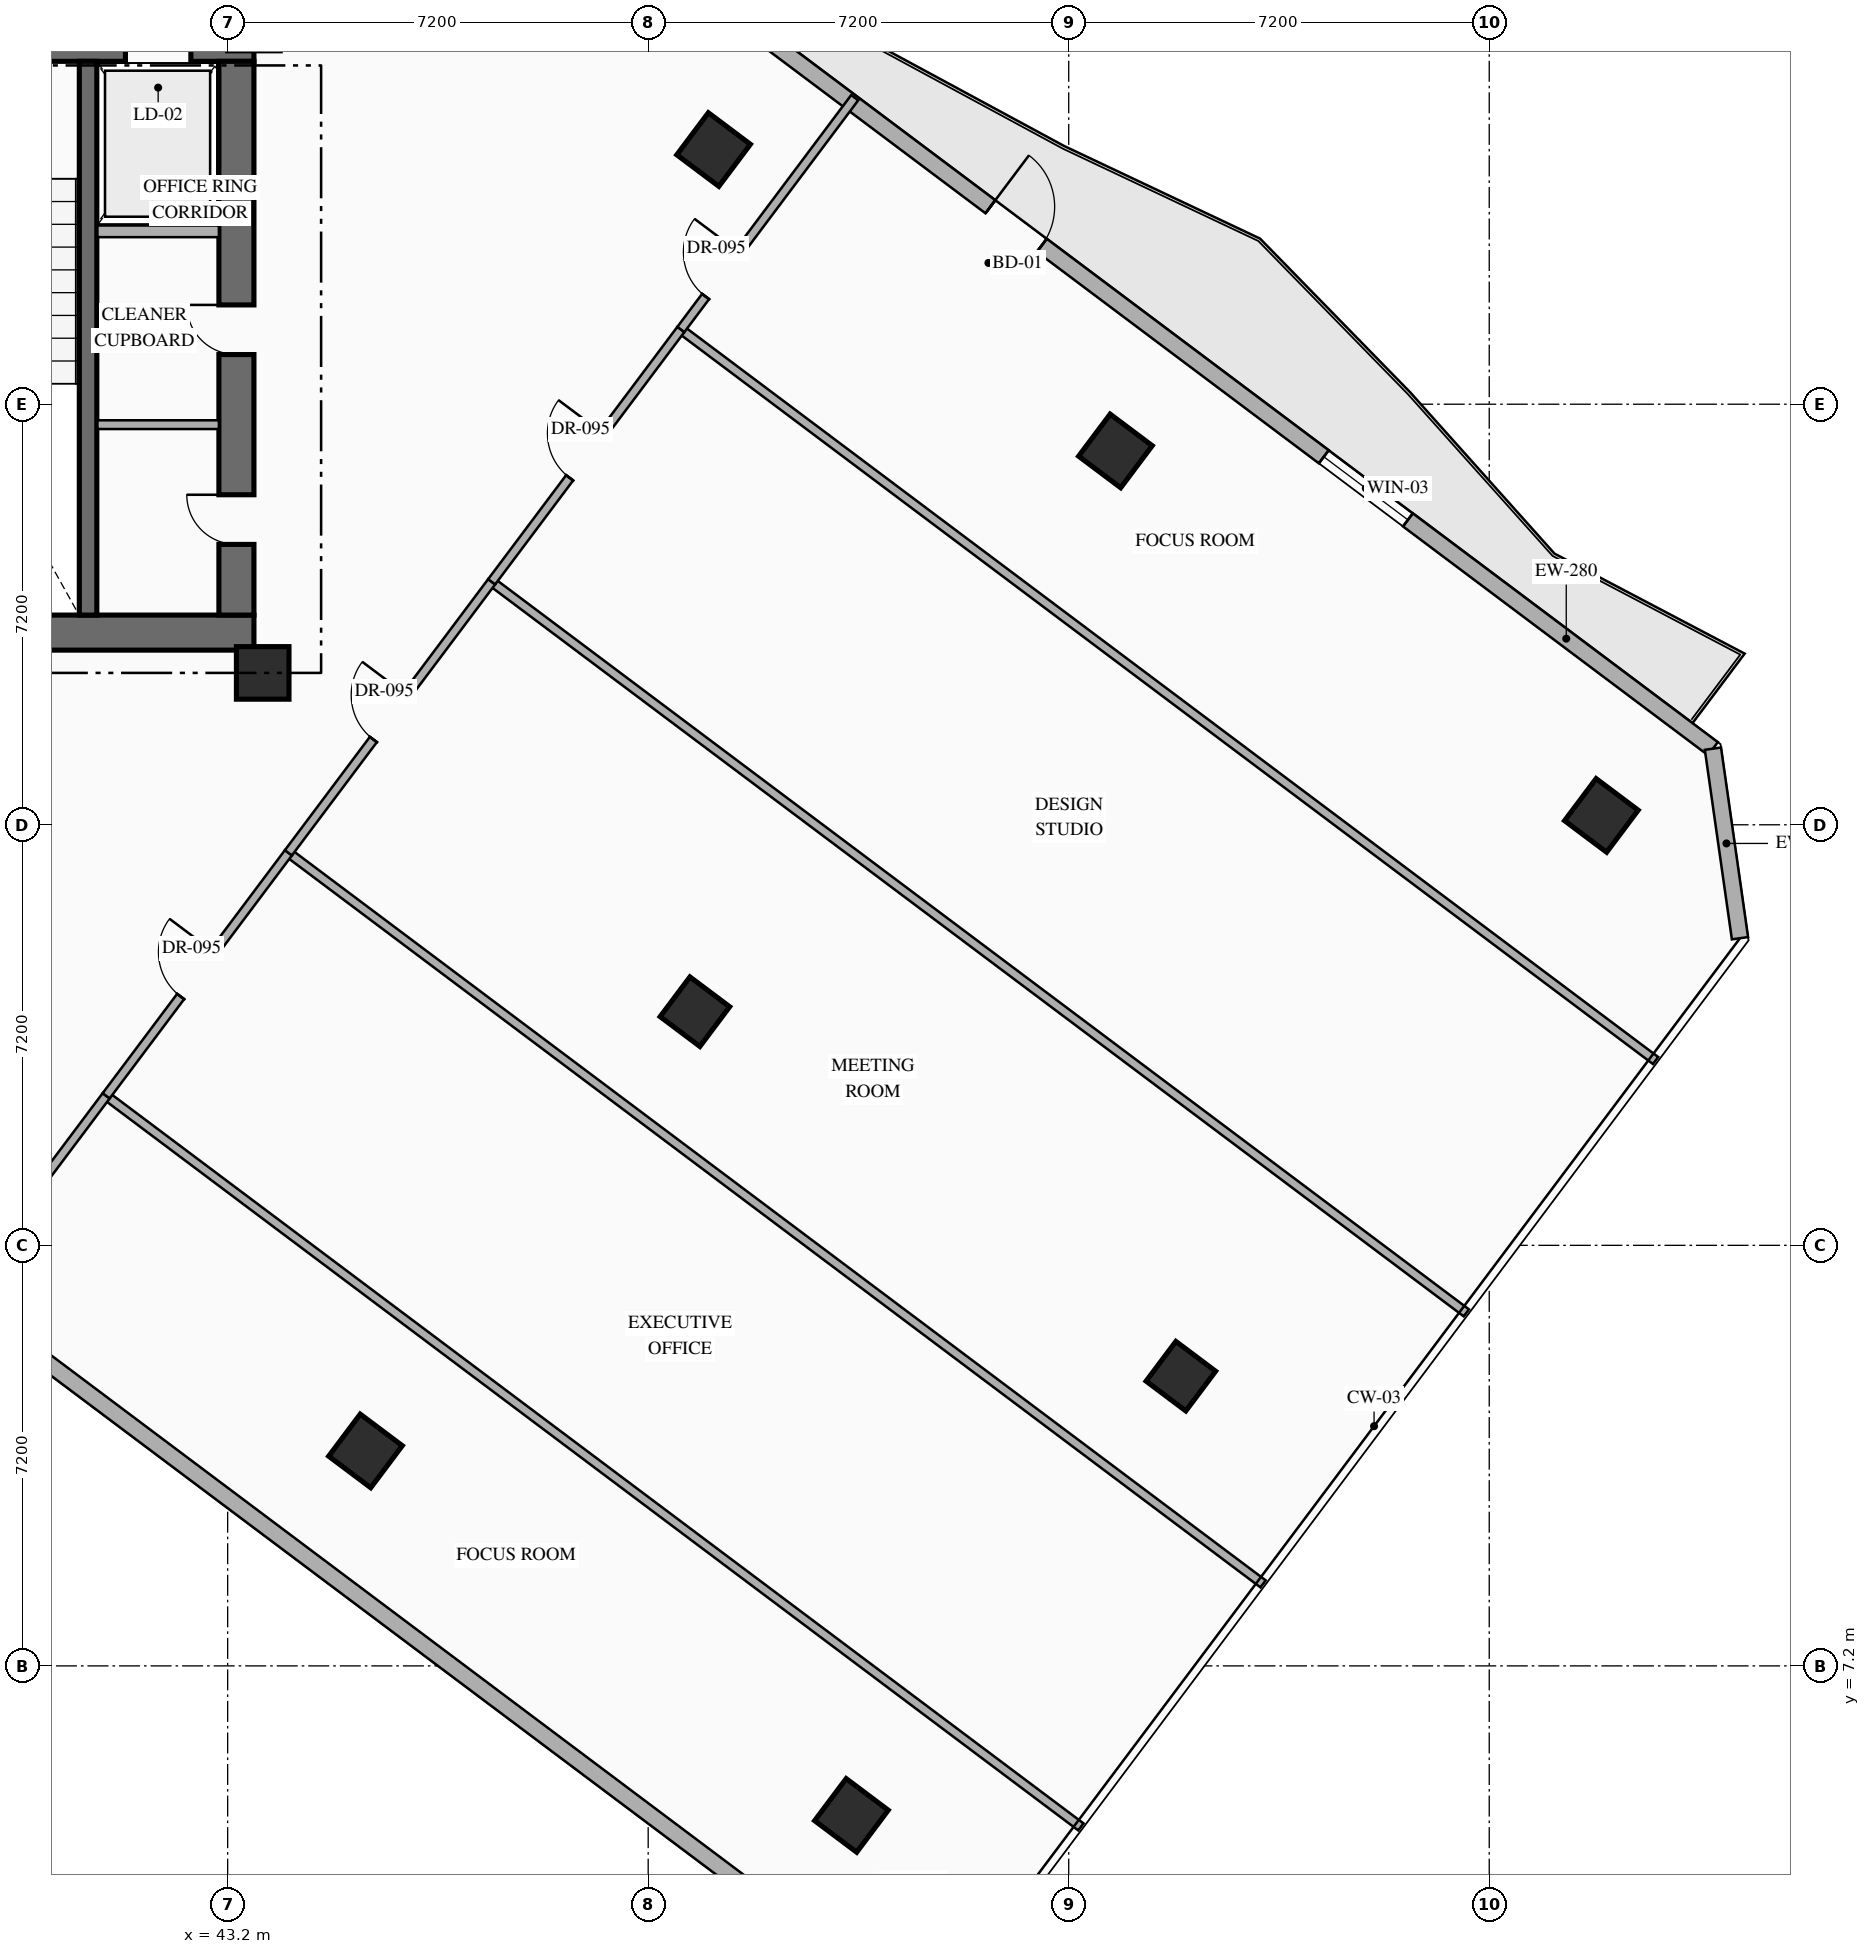
"""IFC4 building model, lengths in metres.
Left out: names, types, materials, properties, quantities, classifications, styles, units other than length and angle.
Written with IfcOpenShell. Run it as: python <this file> out.ifc"""

import sys

from ifc_helpers import new_model, si_unit, direction, frame, frame_2d, origin, origin_2d, place, context, subcontext, project, spatial, rectangle, hollow_rectangle, extrude, element, fill, save


model = new_model("IFC4")
c1 = context("Model", 3, precision=1e-05, world=origin(), true_north=direction((0.0, 1.0)))
c2 = subcontext(c1, "Body", "Model", "MODEL_VIEW")
j1 = project(units=[si_unit("LENGTHUNIT", "METRE"), si_unit("PLANEANGLEUNIT", "RADIAN")], contexts=[c1])
p1 = place(None, origin())
s1 = spatial("IfcSite", under=j1, at=p1, CompositionType="ELEMENT")
p2 = place(p1, origin())
s2 = spatial("IfcBuilding", under=s1, at=p2, CompositionType="ELEMENT")
p3 = place(p2, frame((0.0, 0.0, 122.85)))
s3 = spatial("IfcBuildingStorey", under=s2, at=p3, CompositionType="ELEMENT", Elevation=122.85)
p4 = place(p3, frame((35.89, 24.89, 0.0), z_axis=(0.0, 0.0, 1.0), x_axis=(1.0, 0.0, 0.0)))
e1 = element("IfcWall", 1, at=p4, inside=s3, PredefinedType="SHEAR", context=c2, shape_type="SweptSolid", body=[
    extrude(rectangle(XDim=7.76, YDim=0.6, at=frame_2d((3.88, 0.0))), origin(), (0.0, 0.0, 1.0), 3.6),
])
p5 = place(p3, frame((35.89, 34.97, 0.0), z_axis=(0.0, 0.0, 1.0), x_axis=(1.0, 0.0, 0.0)))
e2 = element("IfcWall", 2, at=p5, inside=s3, PredefinedType="SHEAR", context=c2, shape_type="SweptSolid", body=[
    extrude(rectangle(XDim=7.76, YDim=0.6, at=frame_2d((3.88, 0.0))), origin(), (0.0, 0.0, 1.0), 3.6),
])
p6 = place(p5, frame((2.66, 0.0, 0.0)))
e3 = element("IfcOpeningElement", 3, at=p6, cuts=e2, PredefinedType="OPENING", context=c2, shape_type="SweptSolid", body=[
    extrude(rectangle(XDim=1.1, YDim=2.2, at=frame_2d((0.55, 1.1))), frame((0.0, 0.31, 0.0), z_axis=(0.0, -1.0, 0.0), x_axis=(1.0, 0.0, 0.0)), (0.0, 0.0, 1.0), 0.62),
])
p7 = place(p5, frame((5.56, 0.0, 0.0)))
e4 = element("IfcOpeningElement", 4, at=p7, cuts=e2, PredefinedType="OPENING", context=c2, shape_type="SweptSolid", body=[
    extrude(rectangle(XDim=1.12, YDim=2.15, at=frame_2d((0.56, 1.075))), frame((0.0, 0.31, 0.0), z_axis=(0.0, -1.0, 0.0), x_axis=(1.0, 0.0, 0.0)), (0.0, 0.0, 1.0), 0.62),
])
p8 = place(p3, frame((43.35, 25.19, 0.0), z_axis=(0.0, 0.0, 1.0), x_axis=(0.0, 1.0, 0.0)))
e5 = element("IfcWall", 5, at=p8, inside=s3, PredefinedType="SHEAR", context=c2, shape_type="SweptSolid", body=[
    extrude(rectangle(XDim=9.48, YDim=0.6, at=frame_2d((4.74, 0.0))), origin(), (0.0, 0.0, 1.0), 3.6),
])
p9 = place(p8, frame((1.21, 0.0, 0.0)))
e6 = element("IfcOpeningElement", 6, at=p9, cuts=e5, PredefinedType="OPENING", context=c2, shape_type="SweptSolid", body=[
    extrude(rectangle(XDim=0.85, YDim=2.08, at=frame_2d((0.425, 1.04))), frame((0.0, 0.31, 0.0), z_axis=(0.0, -1.0, 0.0), x_axis=(1.0, 0.0, 0.0)), (0.0, 0.0, 1.0), 0.62),
])
p10 = place(p8, frame((4.46, 0.0, 0.0)))
e7 = element("IfcOpeningElement", 7, at=p10, cuts=e5, PredefinedType="OPENING", context=c2, shape_type="SweptSolid", body=[
    extrude(rectangle(XDim=0.85, YDim=2.08, at=frame_2d((0.425, 1.04))), frame((0.0, 0.31, 0.0), z_axis=(0.0, -1.0, 0.0), x_axis=(1.0, 0.0, 0.0)), (0.0, 0.0, 1.0), 0.62),
])
p11 = place(p3, frame((40.81, 25.19, 0.0), z_axis=(0.0, 0.0, 1.0), x_axis=(0.0, 1.0, 0.0)))
e8 = element("IfcWall", 8, at=p11, inside=s3, PredefinedType="SHEAR", context=c2, shape_type="SweptSolid", body=[
    extrude(rectangle(XDim=9.48, YDim=0.3, at=frame_2d((4.74, 0.0))), origin(), (0.0, 0.0, 1.0), 3.6),
])
p12 = place(p3, frame((43.8, 24.2, 0.0), z_axis=(0.0, 0.0, 1.0), x_axis=(1.0, 0.0, 0.0)))
e9 = element("IfcColumn", 9, at=p12, inside=s3, PredefinedType="COLUMN", context=c2, shape_type="SweptSolid", body=[
    extrude(rectangle(XDim=0.9, YDim=0.9, at=origin_2d()), origin(), (0.0, 0.0, 1.0), 3.6),
])
for number, where, z_axis, x_axis in (
    (10, (51.52, 33.16, 0.0), (0.0, 0.0, 1.0), (0.8, -0.6, 0.0)),
    (11, (45.56, 10.88, 0.0), (0.0, 0.0, 1.0), (0.8, -0.6, 0.0)),
    (12, (58.4, 28.0, 0.0), (0.0, 0.0, 1.0), (0.8, -0.6, 0.0)),
):
    element("IfcColumn", number, at=place(p3, frame(where, z_axis=z_axis, x_axis=x_axis)), inside=s3, PredefinedType="COLUMN", context=c2, shape_type="SweptSolid", body=[
        extrude(hollow_rectangle(XDim=0.9, YDim=0.9, WallThickness=0.036, at=origin_2d()), origin(), (0.0, 0.0, 1.0), 3.6),
    ])
p13 = place(p3, frame((51.2, 18.4, 0.0), z_axis=(0.0, 0.0, 1.0), x_axis=(0.799999996291, -0.600000004945, 0.0)))
e13 = element("IfcColumn", 13, at=p13, inside=s3, PredefinedType="COLUMN", context=c2, shape_type="SweptSolid", body=[
    extrude(hollow_rectangle(XDim=0.85, YDim=0.85, WallThickness=0.032, at=origin_2d()), origin(), (0.0, 0.0, 1.0), 3.6),
])
for number, where, z_axis, x_axis in (
    (14, (53.88, 4.64, 0.0), (0.0, 0.0, 1.0), (0.8, -0.6, 0.0)),
    (15, (66.72, 21.76, 0.0), (0.0, 0.0, 1.0), (0.8, -0.6, 0.0)),
):
    element("IfcColumn", number, at=place(p3, frame(where, z_axis=z_axis, x_axis=x_axis)), inside=s3, PredefinedType="COLUMN", context=c2, shape_type="SweptSolid", body=[
        extrude(hollow_rectangle(XDim=0.9, YDim=0.9, WallThickness=0.036, at=origin_2d()), origin(), (0.0, 0.0, 1.0), 3.6),
    ])
p14 = place(p3, frame((59.52, 12.16, 0.0), z_axis=(0.0, 0.0, 1.0), x_axis=(0.799999996291, -0.600000004945, 0.0)))
e16 = element("IfcColumn", 16, at=p14, inside=s3, PredefinedType="COLUMN", context=c2, shape_type="SweptSolid", body=[
    extrude(hollow_rectangle(XDim=0.85, YDim=0.85, WallThickness=0.032, at=origin_2d()), origin(), (0.0, 0.0, 1.0), 3.6),
])
p15 = place(p3, frame((44.86, 40.73, 0.0), z_axis=(0.0, 0.0, 1.0), x_axis=(0.800006902154, -0.599990797017, 0.0)))
e17 = element("IfcWall", 17, at=p15, inside=s3, PredefinedType="STANDARD", context=c2, shape_type="SweptSolid", body=[
    extrude(rectangle(XDim=29.712, YDim=0.28, at=frame_2d((14.856, 0.0))), origin(), (0.0, 0.0, 1.0), 3.35),
])
p16 = place(p15, frame((14.249, 0.0, 0.0)))
e18 = element("IfcOpeningElement", 18, at=p16, cuts=e17, PredefinedType="OPENING", context=c2, shape_type="SweptSolid", body=[
    extrude(rectangle(XDim=1.1, YDim=2.2, at=frame_2d((0.55, 1.1))), frame((0.0, 0.15, 0.0), z_axis=(0.0, -1.0, 0.0), x_axis=(1.0, 0.0, 0.0)), (0.0, 0.0, 1.0), 0.3),
])
p17 = place(p15, frame((6.528, 0.0, 0.85)))
e19 = element("IfcOpeningElement", 19, at=p17, cuts=e17, PredefinedType="OPENING", context=c2, shape_type="SweptSolid", body=[
    extrude(rectangle(XDim=1.8, YDim=2.1, at=frame_2d((0.9, 1.05))), frame((0.0, 0.15, 0.0), z_axis=(0.0, -1.0, 0.0), x_axis=(1.0, 0.0, 0.0)), (0.0, 0.0, 1.0), 0.3),
])
p18 = place(p15, frame((21.384, 0.0, 0.85)))
e20 = element("IfcOpeningElement", 20, at=p18, cuts=e17, PredefinedType="OPENING", context=c2, shape_type="SweptSolid", body=[
    extrude(rectangle(XDim=1.8, YDim=2.1, at=frame_2d((0.9, 1.05))), frame((0.0, 0.15, 0.0), z_axis=(0.0, -1.0, 0.0), x_axis=(1.0, 0.0, 0.0)), (0.0, 0.0, 1.0), 0.3),
])
p19 = place(p3, frame((68.63, 22.903, 0.0), z_axis=(0.0, 0.0, 1.0), x_axis=(0.141285803956, -0.989968848803, 0.0)))
e21 = element("IfcWall", 21, at=p19, inside=s3, PredefinedType="STANDARD", context=c2, shape_type="SweptSolid", body=[
    extrude(rectangle(XDim=3.278, YDim=0.28, at=frame_2d((1.639, 0.0))), origin(), (0.0, 0.0, 1.0), 3.35),
])
p20 = place(p3, frame((53.318, 2.487, 0.0), z_axis=(0.0, 0.0, 1.0), x_axis=(-0.800004174678, 0.599994433723, 0.0)))
e22 = element("IfcWall", 22, at=p20, inside=s3, PredefinedType="STANDARD", context=c2, shape_type="SweptSolid", body=[
    extrude(rectangle(XDim=35.089, YDim=0.28, at=frame_2d((17.544, 0.0))), origin(), (0.0, 0.0, 1.0), 3.35),
])
p21 = place(p3, frame((40.97, 31.76, 0.0), z_axis=(0.0, 0.0, 1.0), x_axis=(1.0, 0.0, 0.0)))
e23 = element("IfcWall", 23, at=p21, inside=s3, PredefinedType="STANDARD", context=c2, shape_type="SweptSolid", body=[
    extrude(rectangle(XDim=2.08, YDim=0.2, at=frame_2d((1.04, 0.0))), origin(), (0.0, 0.0, 1.0), 3.35),
])
p22 = place(p3, frame((40.97, 28.45, 0.0), z_axis=(0.0, 0.0, 1.0), x_axis=(1.0, 0.0, 0.0)))
e24 = element("IfcWall", 24, at=p22, inside=s3, PredefinedType="PARTITIONING", context=c2, shape_type="SweptSolid", body=[
    extrude(rectangle(XDim=2.08, YDim=0.15, at=frame_2d((1.04, 0.0))), origin(), (0.0, 0.0, 1.0), 3.35),
])
p23 = place(p3, frame((41.12, 16.96, 0.0), z_axis=(0.0, 0.0, 1.0), x_axis=(0.800002808908, -0.599996254772, 0.0)))
e25 = element("IfcWall", 25, at=p23, inside=s3, PredefinedType="PARTITIONING", context=c2, shape_type="SweptSolid", body=[
    extrude(rectangle(XDim=20.86, YDim=0.15, at=frame_2d((10.43, 0.0))), origin(), (0.0, 0.0, 1.0), 3.35),
])
p24 = place(p3, frame((38.504, 13.472, 0.0), z_axis=(0.0, 0.0, 1.0), x_axis=(0.600026876565, 0.799979841871, 0.0)))
e26 = element("IfcWall", 26, at=p24, inside=s3, PredefinedType="PARTITIONING", context=c2, shape_type="SweptSolid", body=[
    extrude(rectangle(XDim=4.36, YDim=0.15, at=frame_2d((2.18, 0.0))), origin(), (0.0, 0.0, 1.0), 3.35),
])
p25 = place(p24, frame((0.38, 0.0, 0.0)))
e27 = element("IfcOpeningElement", 27, at=p25, cuts=e26, PredefinedType="OPENING", context=c2, shape_type="SweptSolid", body=[
    extrude(rectangle(XDim=0.95, YDim=2.15, at=frame_2d((0.475, 1.075))), frame((0.0, 0.085, 0.0), z_axis=(0.0, -1.0, 0.0), x_axis=(1.0, 0.0, 0.0)), (0.0, 0.0, 1.0), 0.17),
])
p26 = place(p3, frame((44.24, 21.12, 0.0), z_axis=(0.0, 0.0, 1.0), x_axis=(0.799997191095, -0.600003745189, 0.0)))
e28 = element("IfcWall", 28, at=p26, inside=s3, PredefinedType="PARTITIONING", context=c2, shape_type="SweptSolid", body=[
    extrude(rectangle(XDim=20.86, YDim=0.15, at=frame_2d((10.43, 0.0))), origin(), (0.0, 0.0, 1.0), 2.995),
])
p27 = place(p3, frame((41.12, 16.96, 0.0), z_axis=(0.0, 0.0, 1.0), x_axis=(0.599969951782, 0.800022535282, 0.0)))
e29 = element("IfcWall", 29, at=p27, inside=s3, PredefinedType="PARTITIONING", context=c2, shape_type="SweptSolid", body=[
    extrude(rectangle(XDim=5.2, YDim=0.15, at=frame_2d((2.6, 0.0))), origin(), (0.0, 0.0, 1.0), 3.35),
])
p28 = place(p27, frame((2.125, 0.0, 0.0)))
e30 = element("IfcOpeningElement", 30, at=p28, cuts=e29, PredefinedType="OPENING", context=c2, shape_type="SweptSolid", body=[
    extrude(rectangle(XDim=0.95, YDim=2.15, at=frame_2d((0.475, 1.075))), frame((0.0, 0.085, 0.0), z_axis=(0.0, -1.0, 0.0), x_axis=(1.0, 0.0, 0.0)), (0.0, 0.0, 1.0), 0.17),
])
p29 = place(p3, frame((47.72, 25.76, 0.0), z_axis=(0.0, 0.0, 1.0), x_axis=(0.799997191095, -0.600003745189, 0.0)))
e31 = element("IfcWall", 31, at=p29, inside=s3, PredefinedType="PARTITIONING", context=c2, shape_type="SweptSolid", body=[
    extrude(rectangle(XDim=20.86, YDim=0.15, at=frame_2d((10.43, 0.0))), origin(), (0.0, 0.0, 1.0), 3.35),
])
p30 = place(p3, frame((44.24, 21.12, 0.0), z_axis=(0.0, 0.0, 1.0), x_axis=(0.600006735006, 0.799994948701, 0.0)))
e32 = element("IfcWall", 32, at=p30, inside=s3, PredefinedType="PARTITIONING", context=c2, shape_type="SweptSolid", body=[
    extrude(rectangle(XDim=5.8, YDim=0.15, at=frame_2d((2.9, 0.0))), origin(), (0.0, 0.0, 1.0), 3.35),
])
p31 = place(p30, frame((2.425, 0.0, 0.0)))
e33 = element("IfcOpeningElement", 33, at=p31, cuts=e32, PredefinedType="OPENING", context=c2, shape_type="SweptSolid", body=[
    extrude(rectangle(XDim=0.95, YDim=2.15, at=frame_2d((0.475, 1.075))), frame((0.0, 0.085, 0.0), z_axis=(0.0, -1.0, 0.0), x_axis=(1.0, 0.0, 0.0)), (0.0, 0.0, 1.0), 0.17),
])
p32 = place(p3, frame((50.96, 30.08, 0.0), z_axis=(0.0, 0.0, 1.0), x_axis=(0.799997191095, -0.600003745189, 0.0)))
e34 = element("IfcWall", 34, at=p32, inside=s3, PredefinedType="PARTITIONING", context=c2, shape_type="SweptSolid", body=[
    extrude(rectangle(XDim=20.86, YDim=0.15, at=frame_2d((10.43, 0.0))), origin(), (0.0, 0.0, 1.0), 3.35),
])
p33 = place(p3, frame((47.72, 25.76, 0.0), z_axis=(0.0, 0.0, 1.0), x_axis=(0.599992766245, 0.800005425265, 0.0)))
e35 = element("IfcWall", 35, at=p33, inside=s3, PredefinedType="PARTITIONING", context=c2, shape_type="SweptSolid", body=[
    extrude(rectangle(XDim=5.4, YDim=0.15, at=frame_2d((2.7, 0.0))), origin(), (0.0, 0.0, 1.0), 3.35),
])
p34 = place(p33, frame((2.225, 0.0, 0.0)))
e36 = element("IfcOpeningElement", 36, at=p34, cuts=e35, PredefinedType="OPENING", context=c2, shape_type="SweptSolid", body=[
    extrude(rectangle(XDim=0.95, YDim=2.15, at=frame_2d((0.475, 1.075))), frame((0.0, 0.085, 0.0), z_axis=(0.0, -1.0, 0.0), x_axis=(1.0, 0.0, 0.0)), (0.0, 0.0, 1.0), 0.17),
])
p35 = place(p3, frame((50.96, 30.08, 0.0), z_axis=(0.0, 0.0, 1.0), x_axis=(0.600007875382, 0.799994093403, 0.0)))
e37 = element("IfcWall", 37, at=p35, inside=s3, PredefinedType="PARTITIONING", context=c2, shape_type="SweptSolid", body=[
    extrude(rectangle(XDim=4.96, YDim=0.15, at=frame_2d((2.48, 0.0))), origin(), (0.0, 0.0, 1.0), 3.35),
])
p36 = place(p35, frame((0.705, 0.0, 0.0)))
e38 = element("IfcOpeningElement", 38, at=p36, cuts=e37, PredefinedType="OPENING", context=c2, shape_type="SweptSolid", body=[
    extrude(rectangle(XDim=0.95, YDim=2.15, at=frame_2d((0.475, 1.075))), frame((0.0, 0.085, 0.0), z_axis=(0.0, -1.0, 0.0), x_axis=(1.0, 0.0, 0.0)), (0.0, 0.0, 1.0), 0.17),
])
p37 = place(p16, origin())
e39 = element("IfcDoor", 39, at=p37, inside=s3, OperationType="SINGLE_SWING_LEFT", PredefinedType="DOOR", context=c2, shape_type="SweptSolid", body=[
    extrude(rectangle(XDim=1.1, YDim=2.2, at=frame_2d((0.55, 1.1))), frame((0.0, 0.025, 0.0), z_axis=(0.0, -1.0, 0.0), x_axis=(1.0, 0.0, 0.0)), (0.0, 0.0, 1.0), 0.05),
])
fill(e18, e39)
p38 = place(p18, origin())
e40 = element("IfcWindow", 40, at=p38, inside=s3, PartitioningType="SINGLE_PANEL", PredefinedType="WINDOW", context=c2, shape_type="SweptSolid", body=[
    extrude(rectangle(XDim=1.8, YDim=2.1, at=frame_2d((0.9, 1.05))), frame((0.0, 0.03, 0.0), z_axis=(0.0, -1.0, 0.0), x_axis=(1.0, 0.0, 0.0)), (0.0, 0.0, 1.0), 0.06),
])
fill(e20, e40)
p39 = place(p9, origin())
e41 = element("IfcDoor", 41, at=p39, inside=s3, OperationType="SINGLE_SWING_RIGHT", PredefinedType="DOOR", context=c2, shape_type="SweptSolid", body=[
    extrude(rectangle(XDim=0.85, YDim=2.08, at=frame_2d((0.425, 1.04))), frame((0.0, 0.025, 0.0), z_axis=(0.0, -1.0, 0.0), x_axis=(1.0, 0.0, 0.0)), (0.0, 0.0, 1.0), 0.05),
])
fill(e6, e41)
p40 = place(p10, origin())
e42 = element("IfcDoor", 42, at=p40, inside=s3, OperationType="SINGLE_SWING_RIGHT", PredefinedType="DOOR", context=c2, shape_type="SweptSolid", body=[
    extrude(rectangle(XDim=0.85, YDim=2.08, at=frame_2d((0.425, 1.04))), frame((0.0, 0.025, 0.0), z_axis=(0.0, -1.0, 0.0), x_axis=(1.0, 0.0, 0.0)), (0.0, 0.0, 1.0), 0.05),
])
fill(e7, e42)
p41 = place(p28, origin())
e43 = element("IfcDoor", 43, at=p41, inside=s3, OperationType="SINGLE_SWING_RIGHT", PredefinedType="DOOR", context=c2, shape_type="SweptSolid", body=[
    extrude(rectangle(XDim=0.95, YDim=2.15, at=frame_2d((0.475, 1.075))), frame((0.0, 0.025, 0.0), z_axis=(0.0, -1.0, 0.0), x_axis=(1.0, 0.0, 0.0)), (0.0, 0.0, 1.0), 0.05),
])
fill(e30, e43)
p42 = place(p31, origin())
e44 = element("IfcDoor", 44, at=p42, inside=s3, OperationType="SINGLE_SWING_RIGHT", PredefinedType="DOOR", context=c2, shape_type="SweptSolid", body=[
    extrude(rectangle(XDim=0.95, YDim=2.15, at=frame_2d((0.475, 1.075))), frame((0.0, 0.025, 0.0), z_axis=(0.0, -1.0, 0.0), x_axis=(1.0, 0.0, 0.0)), (0.0, 0.0, 1.0), 0.05),
])
fill(e33, e44)
p43 = place(p34, origin())
e45 = element("IfcDoor", 45, at=p43, inside=s3, OperationType="SINGLE_SWING_RIGHT", PredefinedType="DOOR", context=c2, shape_type="SweptSolid", body=[
    extrude(rectangle(XDim=0.95, YDim=2.15, at=frame_2d((0.475, 1.075))), frame((0.0, 0.025, 0.0), z_axis=(0.0, -1.0, 0.0), x_axis=(1.0, 0.0, 0.0)), (0.0, 0.0, 1.0), 0.05),
])
fill(e36, e45)
p44 = place(p36, origin())
e46 = element("IfcDoor", 46, at=p44, inside=s3, OperationType="SINGLE_SWING_RIGHT", PredefinedType="DOOR", context=c2, shape_type="SweptSolid", body=[
    extrude(rectangle(XDim=0.95, YDim=2.15, at=frame_2d((0.475, 1.075))), frame((0.0, 0.025, 0.0), z_axis=(0.0, -1.0, 0.0), x_axis=(1.0, 0.0, 0.0)), (0.0, 0.0, 1.0), 0.05),
])
fill(e38, e46)
save(model, sys.argv[1])
